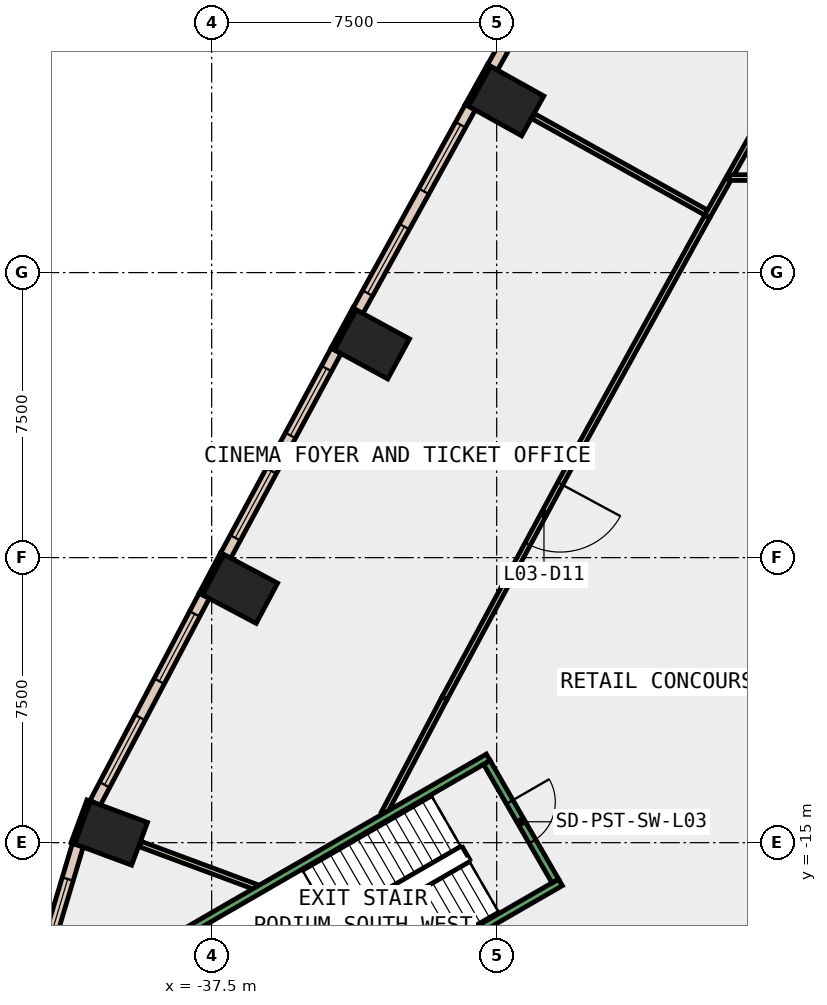
"""IFC4 building model, lengths in metres.
Left out: names, types, materials, properties, quantities, classifications, styles, units other than length and angle.
Written with IfcOpenShell. Run it as: python <this file> out.ifc"""

import sys

from ifc_helpers import new_model, si_unit, direction, frame, frame_2d, origin, origin_2d, place, context, subcontext, project, spatial, rectangle, extrude, element, fill, save


model = new_model("IFC4")
c1 = context("Model", 3, precision=1e-05, world=origin(), true_north=direction((0.0, 1.0)))
c2 = subcontext(c1, "Body", "Model", "MODEL_VIEW")
j1 = project(units=[si_unit("LENGTHUNIT", "METRE"), si_unit("PLANEANGLEUNIT", "RADIAN")], contexts=[c1])
p1 = place(None, origin())
s1 = spatial("IfcSite", under=j1, at=p1, CompositionType="ELEMENT")
p2 = place(p1, origin())
s2 = spatial("IfcBuilding", under=s1, at=p2, CompositionType="ELEMENT")
p3 = place(p2, frame((0.0, 0.0, 20.0)))
s3 = spatial("IfcBuildingStorey", under=s2, at=p3, CompositionType="ELEMENT", Elevation=20.0)
for number, where, z_axis, x_axis in (
    (1, (-29.75, 4.512, -0.45), (0.0, 0.0, 1.0), (0.487, 0.873, 0.0)),
    (2, (-33.283, -1.889, -0.45), (0.0, 0.0, 1.0), (0.478, 0.878, 0.0)),
    (3, (-36.753, -8.325, -0.45), (0.0, 0.0, 1.0), (0.469, 0.883, 0.0)),
    (4, (-40.147, -14.751, -0.45), (0.0, 0.0, 1.0), (0.348, 0.937, 0.0)),
):
    element("IfcColumn", number, at=place(p3, frame(where, z_axis=z_axis, x_axis=x_axis)), inside=s3, PredefinedType="COLUMN", context=c2, shape_type="SweptSolid", body=[
        extrude(rectangle(XDim=1.2, YDim=1.6, at=origin_2d()), origin(), (0.0, 0.0, 1.0), 5.0),
    ])
p4 = place(p3, frame((-30.2, 5.45, 0.0), z_axis=(0.0, 0.0, 1.0), x_axis=(-0.486817526853, -0.873503689488, 0.0)))
e5 = element("IfcWall", 5, at=p4, inside=s3, PredefinedType="STANDARD", context=c2, shape_type="SweptSolid", body=[
    extrude(rectangle(XDim=1.2, YDim=0.1, at=frame_2d((0.6, 0.0))), origin(), (0.0, 0.0, 1.0), 4.55),
])
p5 = place(p3, frame((-33.742, -0.956, 0.0), z_axis=(0.0, 0.0, 1.0), x_axis=(-0.478267644701, -0.878214131082, 0.0)))
e6 = element("IfcWall", 6, at=p5, inside=s3, PredefinedType="STANDARD", context=c2, shape_type="SweptSolid", body=[
    extrude(rectangle(XDim=1.2, YDim=0.1, at=frame_2d((0.6, 0.0))), origin(), (0.0, 0.0, 1.0), 4.55),
])
p6 = place(p3, frame((-37.222, -7.397, 0.0), z_axis=(0.0, 0.0, 1.0), x_axis=(-0.469383408131, -0.882994459876, 0.0)))
e7 = element("IfcWall", 7, at=p6, inside=s3, PredefinedType="STANDARD", context=c2, shape_type="SweptSolid", body=[
    extrude(rectangle(XDim=1.199, YDim=0.1, at=frame_2d((0.6, 0.0))), origin(), (0.0, 0.0, 1.0), 4.55),
])
p7 = place(p3, frame((-40.735, -13.893, 0.0), z_axis=(0.0, 0.0, 1.0), x_axis=(-0.348268249601, -0.937394914814, 0.0)))
e8 = element("IfcWall", 8, at=p7, inside=s3, PredefinedType="STANDARD", context=c2, shape_type="SweptSolid", body=[
    extrude(rectangle(XDim=1.2, YDim=0.1, at=frame_2d((0.6, 0.0))), origin(), (0.0, 0.0, 1.0), 4.55),
])
p8 = place(p3, frame((-27.101, 10.73, 0.0), z_axis=(0.0, 0.0, 1.0), x_axis=(-0.491661677717, -0.870786308267, 0.0)))
e9 = element("IfcWall", 9, at=p8, inside=s3, PredefinedType="STANDARD", context=c2, shape_type="SweptSolid", body=[
    extrude(rectangle(XDim=6.122, YDim=0.3, at=frame_2d((3.061, 0.0))), origin(), (0.0, 0.0, 1.0), 4.55),
])
p9 = place(p8, frame((0.531, 0.0, 1.0)))
e10 = element("IfcOpeningElement", 10, at=p9, cuts=e9, PredefinedType="OPENING", context=c2, shape_type="SweptSolid", body=[
    extrude(rectangle(XDim=2.0, YDim=3.2, at=frame_2d((1.0, 1.6))), frame((0.0, 0.16, 0.0), z_axis=(0.0, -1.0, 0.0), x_axis=(1.0, 0.0, 0.0)), (0.0, 0.0, 1.0), 0.32),
])
p10 = place(p8, frame((3.592, 0.0, 1.0)))
e11 = element("IfcOpeningElement", 11, at=p10, cuts=e9, PredefinedType="OPENING", context=c2, shape_type="SweptSolid", body=[
    extrude(rectangle(XDim=2.0, YDim=3.2, at=frame_2d((1.0, 1.6))), frame((0.0, 0.16, 0.0), z_axis=(0.0, -1.0, 0.0), x_axis=(1.0, 0.0, 0.0)), (0.0, 0.0, 1.0), 0.32),
])
p11 = place(p3, frame((-30.694, 4.353, 0.0), z_axis=(0.0, 0.0, 1.0), x_axis=(-0.483233380559, -0.875491576152, 0.0)))
e12 = element("IfcWall", 12, at=p11, inside=s3, PredefinedType="STANDARD", context=c2, shape_type="SweptSolid", body=[
    extrude(rectangle(XDim=6.121, YDim=0.3, at=frame_2d((3.061, 0.0))), origin(), (0.0, 0.0, 1.0), 4.55),
])
p12 = place(p11, frame((0.53, 0.0, 1.0)))
e13 = element("IfcOpeningElement", 13, at=p12, cuts=e12, PredefinedType="OPENING", context=c2, shape_type="SweptSolid", body=[
    extrude(rectangle(XDim=2.0, YDim=3.2, at=frame_2d((1.0, 1.6))), frame((0.0, 0.16, 0.0), z_axis=(0.0, -1.0, 0.0), x_axis=(1.0, 0.0, 0.0)), (0.0, 0.0, 1.0), 0.32),
])
p13 = place(p11, frame((3.591, 0.0, 1.0)))
e14 = element("IfcOpeningElement", 14, at=p13, cuts=e12, PredefinedType="OPENING", context=c2, shape_type="SweptSolid", body=[
    extrude(rectangle(XDim=2.0, YDim=3.2, at=frame_2d((1.0, 1.6))), frame((0.0, 0.16, 0.0), z_axis=(0.0, -1.0, 0.0), x_axis=(1.0, 0.0, 0.0)), (0.0, 0.0, 1.0), 0.32),
])
p14 = place(p3, frame((-34.226, -2.058, 0.0), z_axis=(0.0, 0.0, 1.0), x_axis=(-0.474584950749, -0.880209704856, 0.0)))
e15 = element("IfcWall", 15, at=p14, inside=s3, PredefinedType="STANDARD", context=c2, shape_type="SweptSolid", body=[
    extrude(rectangle(XDim=6.121, YDim=0.3, at=frame_2d((3.061, 0.0))), origin(), (0.0, 0.0, 1.0), 4.55),
])
p15 = place(p14, frame((0.53, 0.0, 1.0)))
e16 = element("IfcOpeningElement", 16, at=p15, cuts=e15, PredefinedType="OPENING", context=c2, shape_type="SweptSolid", body=[
    extrude(rectangle(XDim=2.0, YDim=3.2, at=frame_2d((1.0, 1.6))), frame((0.0, 0.16, 0.0), z_axis=(0.0, -1.0, 0.0), x_axis=(1.0, 0.0, 0.0)), (0.0, 0.0, 1.0), 0.32),
])
p16 = place(p14, frame((3.591, 0.0, 1.0)))
e17 = element("IfcOpeningElement", 17, at=p16, cuts=e15, PredefinedType="OPENING", context=c2, shape_type="SweptSolid", body=[
    extrude(rectangle(XDim=2.0, YDim=3.2, at=frame_2d((1.0, 1.6))), frame((0.0, 0.16, 0.0), z_axis=(0.0, -1.0, 0.0), x_axis=(1.0, 0.0, 0.0)), (0.0, 0.0, 1.0), 0.32),
])
p17 = place(p3, frame((-37.695, -8.503, 0.0), z_axis=(0.0, 0.0, 1.0), x_axis=(-0.466125129602, -0.884718804792, 0.0)))
e18 = element("IfcWall", 18, at=p17, inside=s3, PredefinedType="STANDARD", context=c2, shape_type="SweptSolid", body=[
    extrude(rectangle(XDim=6.164, YDim=0.3, at=frame_2d((3.082, 0.0))), origin(), (0.0, 0.0, 1.0), 4.55),
])
p18 = place(p17, frame((0.541, 0.0, 1.0)))
e19 = element("IfcOpeningElement", 19, at=p18, cuts=e18, PredefinedType="OPENING", context=c2, shape_type="SweptSolid", body=[
    extrude(rectangle(XDim=2.0, YDim=3.2, at=frame_2d((1.0, 1.6))), frame((0.0, 0.16, 0.0), z_axis=(0.0, -1.0, 0.0), x_axis=(1.0, 0.0, 0.0)), (0.0, 0.0, 1.0), 0.32),
])
p19 = place(p17, frame((3.623, 0.0, 1.0)))
e20 = element("IfcOpeningElement", 20, at=p19, cuts=e18, PredefinedType="OPENING", context=c2, shape_type="SweptSolid", body=[
    extrude(rectangle(XDim=2.0, YDim=3.2, at=frame_2d((1.0, 1.6))), frame((0.0, 0.16, 0.0), z_axis=(0.0, -1.0, 0.0), x_axis=(1.0, 0.0, 0.0)), (0.0, 0.0, 1.0), 0.32),
])
p20 = place(p3, frame((-41.022, -15.066, 0.0), z_axis=(0.0, 0.0, 1.0), x_axis=(-0.285800575124, -0.958289116738, 0.0)))
e21 = element("IfcWall", 21, at=p20, inside=s3, PredefinedType="STANDARD", context=c2, shape_type="SweptSolid", body=[
    extrude(rectangle(XDim=3.46, YDim=0.3, at=frame_2d((1.73, 0.0))), origin(), (0.0, 0.0, 1.0), 4.55),
])
p21 = place(p20, frame((0.93, 0.0, 1.0)))
e22 = element("IfcOpeningElement", 22, at=p21, cuts=e21, PredefinedType="OPENING", context=c2, shape_type="SweptSolid", body=[
    extrude(rectangle(XDim=1.6, YDim=3.2, at=frame_2d((0.8, 1.6))), frame((0.0, 0.16, 0.0), z_axis=(0.0, -1.0, 0.0), x_axis=(1.0, 0.0, 0.0)), (0.0, 0.0, 1.0), 0.32),
])
p22 = place(p3, frame((-24.422, 1.542, 0.0), z_axis=(0.0, 0.0, 1.0), x_axis=(-0.873438758077, 0.48693401595, 0.0)))
e23 = element("IfcWall", 23, at=p22, inside=s3, PredefinedType="PARTITIONING", context=c2, shape_type="SweptSolid", body=[
    extrude(rectangle(XDim=5.28, YDim=0.15, at=frame_2d((2.64, 0.0))), origin(), (0.0, 0.0, 1.0), 4.55),
])
p23 = place(p3, frame((-20.858, 7.855, 0.0), z_axis=(0.0, 0.0, 1.0), x_axis=(-0.491659598838, -0.870787482036, 0.0)))
e24 = element("IfcWall", 24, at=p23, inside=s3, PredefinedType="PARTITIONING", context=c2, shape_type="SweptSolid", body=[
    extrude(rectangle(XDim=7.324, YDim=0.15, at=frame_2d((3.662, 0.0))), origin(), (0.0, 0.0, 1.0), 4.55),
])
p24 = place(p3, frame((-24.458, 1.477, 0.0), z_axis=(0.0, 0.0, 1.0), x_axis=(-0.483150131412, -0.875537520907, 0.0)))
e25 = element("IfcWall", 25, at=p24, inside=s3, PredefinedType="PARTITIONING", context=c2, shape_type="SweptSolid", body=[
    extrude(rectangle(XDim=7.182, YDim=0.15, at=frame_2d((3.591, 0.0))), origin(), (0.0, 0.0, 1.0), 4.55),
])
p25 = place(p3, frame((-27.928, -4.811, 0.0), z_axis=(0.0, 0.0, 1.0), x_axis=(-0.474637598335, -0.880181316688, 0.0)))
e26 = element("IfcWall", 26, at=p25, inside=s3, PredefinedType="PARTITIONING", context=c2, shape_type="SweptSolid", body=[
    extrude(rectangle(XDim=7.254, YDim=0.15, at=frame_2d((3.627, 0.0))), origin(), (0.0, 0.0, 1.0), 4.55),
])
p26 = place(p25, frame((0.844, 0.0, 0.0)))
e27 = element("IfcOpeningElement", 27, at=p26, cuts=e26, PredefinedType="OPENING", context=c2, shape_type="SweptSolid", body=[
    extrude(rectangle(XDim=1.8, YDim=2.1, at=frame_2d((0.9, 1.05))), frame((0.0, 0.085, 0.0), z_axis=(0.0, -1.0, 0.0), x_axis=(1.0, 0.0, 0.0)), (0.0, 0.0, 1.0), 0.17),
])
p27 = place(p3, frame((-31.371, -11.196, 0.0), z_axis=(0.0, 0.0, 1.0), x_axis=(-0.465955257404, -0.884808283244, 0.0)))
e28 = element("IfcWall", 28, at=p27, inside=s3, PredefinedType="PARTITIONING", context=c2, shape_type="SweptSolid", body=[
    extrude(rectangle(XDim=3.421, YDim=0.15, at=frame_2d((1.71, 0.0))), origin(), (0.0, 0.0, 1.0), 4.55),
])
p28 = place(p3, frame((-36.334, -16.168, 0.0), z_axis=(0.0, 0.0, 1.0), x_axis=(-0.937400028274, 0.348254485961, 0.0)))
e29 = element("IfcWall", 29, at=p28, inside=s3, PredefinedType="PARTITIONING", context=c2, shape_type="SweptSolid", body=[
    extrude(rectangle(XDim=3.247, YDim=0.15, at=frame_2d((1.624, 0.0))), origin(), (0.0, 0.0, 1.0), 4.55),
])
p29 = place(p3, frame((-23.881, 2.5, 0.0), z_axis=(0.0, 0.0, 1.0), x_axis=(1.0, 0.0, 0.0)))
e30 = element("IfcWall", 30, at=p29, inside=s3, PredefinedType="PARTITIONING", context=c2, shape_type="SweptSolid", body=[
    extrude(rectangle(XDim=1.867, YDim=0.15, at=frame_2d((0.934, 0.0))), origin(), (0.0, 0.0, 1.0), 4.55),
])
for number, where, z_axis, x_axis in (
    (31, (-30.222, -12.755, 0.0), (0.0, 0.0, 1.0), (-0.866, -0.5, 0.0)),
    (32, (-28.322, -16.045, 0.0), (0.0, 0.0, 1.0), (-0.866, -0.5, 0.0)),
):
    element("IfcWall", number, at=place(p3, frame(where, z_axis=z_axis, x_axis=x_axis)), inside=s3, PredefinedType="STANDARD", context=c2, shape_type="SweptSolid", body=[
        extrude(rectangle(XDim=9.8, YDim=0.2, at=frame_2d((4.9, 0.0))), origin(), (0.0, 0.0, 1.0), 4.55),
    ])
p30 = place(p3, frame((-30.258, -12.891, 0.0), z_axis=(0.0, 0.0, 1.0), x_axis=(0.499982693035, -0.866035395735, 0.0)))
e33 = element("IfcWall", 33, at=p30, inside=s3, PredefinedType="STANDARD", context=c2, shape_type="SweptSolid", body=[
    extrude(rectangle(XDim=3.6, YDim=0.2, at=frame_2d((1.8, 0.0))), origin(), (0.0, 0.0, 1.0), 4.55),
])
p31 = place(p30, frame((1.2, 0.0, 0.0)))
e34 = element("IfcOpeningElement", 34, at=p31, cuts=e33, PredefinedType="OPENING", context=c2, shape_type="SweptSolid", body=[
    extrude(rectangle(XDim=1.2, YDim=2.2, at=frame_2d((0.6, 1.1))), frame((0.0, 0.11, 0.0), z_axis=(0.0, -1.0, 0.0), x_axis=(1.0, 0.0, 0.0)), (0.0, 0.0, 1.0), 0.22),
])
p32 = place(p12, origin())
e35 = element("IfcWindow", 35, at=p32, inside=s3, PartitioningType="SINGLE_PANEL", PredefinedType="WINDOW", context=c2, shape_type="SweptSolid", body=[
    extrude(rectangle(XDim=2.0, YDim=3.2, at=frame_2d((1.0, 1.6))), frame((0.0, 0.03, 0.0), z_axis=(0.0, -1.0, 0.0), x_axis=(1.0, 0.0, 0.0)), (0.0, 0.0, 1.0), 0.06),
])
fill(e13, e35)
p33 = place(p13, origin())
e36 = element("IfcWindow", 36, at=p33, inside=s3, PartitioningType="SINGLE_PANEL", PredefinedType="WINDOW", context=c2, shape_type="SweptSolid", body=[
    extrude(rectangle(XDim=2.0, YDim=3.2, at=frame_2d((1.0, 1.6))), frame((0.0, 0.03, 0.0), z_axis=(0.0, -1.0, 0.0), x_axis=(1.0, 0.0, 0.0)), (0.0, 0.0, 1.0), 0.06),
])
fill(e14, e36)
p34 = place(p15, origin())
e37 = element("IfcWindow", 37, at=p34, inside=s3, PartitioningType="SINGLE_PANEL", PredefinedType="WINDOW", context=c2, shape_type="SweptSolid", body=[
    extrude(rectangle(XDim=2.0, YDim=3.2, at=frame_2d((1.0, 1.6))), frame((0.0, 0.03, 0.0), z_axis=(0.0, -1.0, 0.0), x_axis=(1.0, 0.0, 0.0)), (0.0, 0.0, 1.0), 0.06),
])
fill(e16, e37)
p35 = place(p16, origin())
e38 = element("IfcWindow", 38, at=p35, inside=s3, PartitioningType="SINGLE_PANEL", PredefinedType="WINDOW", context=c2, shape_type="SweptSolid", body=[
    extrude(rectangle(XDim=2.0, YDim=3.2, at=frame_2d((1.0, 1.6))), frame((0.0, 0.03, 0.0), z_axis=(0.0, -1.0, 0.0), x_axis=(1.0, 0.0, 0.0)), (0.0, 0.0, 1.0), 0.06),
])
fill(e17, e38)
p36 = place(p18, origin())
e39 = element("IfcWindow", 39, at=p36, inside=s3, PartitioningType="SINGLE_PANEL", PredefinedType="WINDOW", context=c2, shape_type="SweptSolid", body=[
    extrude(rectangle(XDim=2.0, YDim=3.2, at=frame_2d((1.0, 1.6))), frame((0.0, 0.03, 0.0), z_axis=(0.0, -1.0, 0.0), x_axis=(1.0, 0.0, 0.0)), (0.0, 0.0, 1.0), 0.06),
])
fill(e19, e39)
p37 = place(p19, origin())
e40 = element("IfcWindow", 40, at=p37, inside=s3, PartitioningType="SINGLE_PANEL", PredefinedType="WINDOW", context=c2, shape_type="SweptSolid", body=[
    extrude(rectangle(XDim=2.0, YDim=3.2, at=frame_2d((1.0, 1.6))), frame((0.0, 0.03, 0.0), z_axis=(0.0, -1.0, 0.0), x_axis=(1.0, 0.0, 0.0)), (0.0, 0.0, 1.0), 0.06),
])
fill(e20, e40)
p38 = place(p21, origin())
e41 = element("IfcWindow", 41, at=p38, inside=s3, PartitioningType="SINGLE_PANEL", PredefinedType="WINDOW", context=c2, shape_type="SweptSolid", body=[
    extrude(rectangle(XDim=1.6, YDim=3.2, at=frame_2d((0.8, 1.6))), frame((0.0, 0.03, 0.0), z_axis=(0.0, -1.0, 0.0), x_axis=(1.0, 0.0, 0.0)), (0.0, 0.0, 1.0), 0.06),
])
fill(e22, e41)
p39 = place(p26, origin())
e42 = element("IfcDoor", 42, at=p39, inside=s3, OperationType="DOUBLE_DOOR_SINGLE_SWING", PredefinedType="DOOR", context=c2, shape_type="SweptSolid", body=[
    extrude(rectangle(XDim=1.8, YDim=2.1, at=frame_2d((0.9, 1.05))), frame((0.0, 0.025, 0.0), z_axis=(0.0, -1.0, 0.0), x_axis=(1.0, 0.0, 0.0)), (0.0, 0.0, 1.0), 0.05),
])
fill(e27, e42)
p40 = place(p31, origin())
e43 = element("IfcDoor", 43, at=p40, inside=s3, OperationType="SINGLE_SWING_LEFT", PredefinedType="DOOR", context=c2, shape_type="SweptSolid", body=[
    extrude(rectangle(XDim=1.2, YDim=2.2, at=frame_2d((0.6, 1.1))), frame((0.0, 0.025, 0.0), z_axis=(0.0, -1.0, 0.0), x_axis=(1.0, 0.0, 0.0)), (0.0, 0.0, 1.0), 0.05),
])
fill(e34, e43)
save(model, sys.argv[1])
